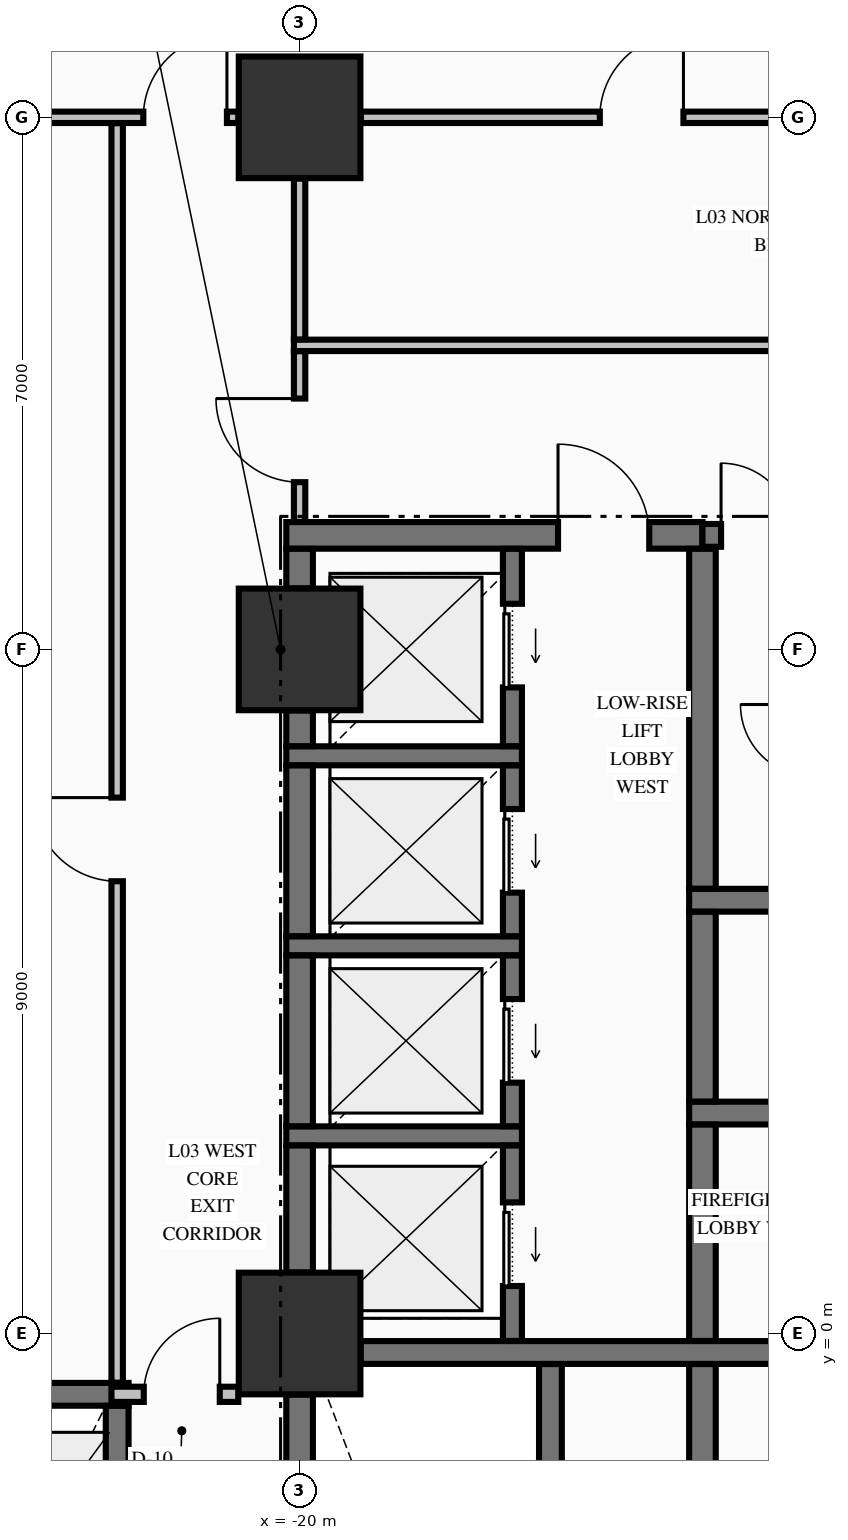
"""IFC4 building model, lengths in metres.
Left out: names, types, materials, properties, quantities, classifications, styles, units other than length and angle.
Written with IfcOpenShell. Run it as: python <this file> out.ifc"""

import sys

from ifc_helpers import new_model, si_unit, direction, frame, frame_2d, origin, origin_2d, place, context, subcontext, project, spatial, rectangle, extrude, element, fill, save


model = new_model("IFC4")
c1 = context("Model", 3, precision=1e-05, world=origin(), true_north=direction((0.0, 1.0)))
c2 = subcontext(c1, "Body", "Model", "MODEL_VIEW")
j1 = project(units=[si_unit("LENGTHUNIT", "METRE"), si_unit("PLANEANGLEUNIT", "RADIAN")], contexts=[c1])
p1 = place(None, origin())
s1 = spatial("IfcSite", under=j1, at=p1, CompositionType="ELEMENT")
p2 = place(p1, origin())
s2 = spatial("IfcBuilding", under=s1, at=p2, CompositionType="ELEMENT")
p3 = place(p2, frame((0.0, 0.0, 16.32)))
s3 = spatial("IfcBuildingStorey", under=s2, at=p3, CompositionType="ELEMENT", Elevation=16.32)
for number, where, z_axis, x_axis in (
    (1, (-20.0, 0.0, 0.0), (0.0, 0.0, 1.0), (1.0, 0.0, 0.0)),
    (2, (-20.0, 9.0, 0.0), (0.0, 0.0, 1.0), (1.0, 0.0, 0.0)),
    (3, (-20.0, 16.0, 0.0), (0.0, 0.0, 1.0), (1.0, 0.0, 0.0)),
):
    element("IfcColumn", number, at=place(p3, frame(where, z_axis=z_axis, x_axis=x_axis)), inside=s3, PredefinedType="COLUMN", context=c2, shape_type="SweptSolid", body=[
        extrude(rectangle(XDim=1.6, YDim=1.6, at=origin_2d()), origin(), (0.0, 0.0, 1.0), 4.99),
    ])
p4 = place(p3, frame((-25.296, -0.8, 0.0), z_axis=(0.0, 0.0, 1.0), x_axis=(1.0, 0.0, 0.0)))
e4 = element("IfcWall", 4, at=p4, inside=s3, PredefinedType="SHEAR", context=c2, shape_type="SweptSolid", body=[
    extrude(rectangle(XDim=3.046, YDim=0.3, at=frame_2d((1.523, 0.0))), origin(), (0.0, 0.0, 1.0), 4.99),
])
p5 = place(p3, frame((-19.196, -0.25, 0.0), z_axis=(0.0, 0.0, 1.0), x_axis=(1.0, 0.0, 0.0)))
e5 = element("IfcWall", 5, at=p5, inside=s3, PredefinedType="SHEAR", context=c2, shape_type="SweptSolid", body=[
    extrude(rectangle(XDim=7.392, YDim=0.3, at=frame_2d((3.696, 0.0))), origin(), (0.0, 0.0, 1.0), 4.99),
])
p6 = place(p5, frame((5.496, 0.0, 0.0)))
e6 = element("IfcOpeningElement", 6, at=p6, cuts=e5, PredefinedType="OPENING", context=c2, shape_type="SweptSolid", body=[
    extrude(rectangle(XDim=1.1, YDim=2.15, at=frame_2d((0.55, 1.075))), frame((0.0, 0.16, 0.0), z_axis=(0.0, -1.0, 0.0), x_axis=(1.0, 0.0, 0.0)), (0.0, 0.0, 1.0), 0.32),
])
p7 = place(p3, frame((-20.175, 2.6, 0.0), z_axis=(0.0, 0.0, 1.0), x_axis=(1.0, 0.0, 0.0)))
e7 = element("IfcWall", 7, at=p7, inside=s3, PredefinedType="SOLIDWALL", context=c2, shape_type="SweptSolid", body=[
    extrude(rectangle(XDim=3.1, YDim=0.25, at=frame_2d((1.55, 0.0))), origin(), (0.0, 0.0, 1.0), 4.99),
])
p8 = place(p3, frame((-14.875, 2.9, 0.0), z_axis=(0.0, 0.0, 1.0), x_axis=(1.0, 0.0, 0.0)))
e8 = element("IfcWall", 8, at=p8, inside=s3, PredefinedType="SHEAR", context=c2, shape_type="SweptSolid", body=[
    extrude(rectangle(XDim=4.025, YDim=0.3, at=frame_2d((2.012, 0.0))), origin(), (0.0, 0.0, 1.0), 4.99),
])
p9 = place(p8, frame((2.075, 0.0, 0.0)))
e9 = element("IfcOpeningElement", 9, at=p9, cuts=e8, PredefinedType="OPENING", context=c2, shape_type="SweptSolid", body=[
    extrude(rectangle(XDim=1.1, YDim=2.2, at=frame_2d((0.55, 1.1))), frame((0.0, 0.16, 0.0), z_axis=(0.0, -1.0, 0.0), x_axis=(1.0, 0.0, 0.0)), (0.0, 0.0, 1.0), 0.32),
])
p10 = place(p3, frame((-20.175, 5.1, 0.0), z_axis=(0.0, 0.0, 1.0), x_axis=(1.0, 0.0, 0.0)))
e10 = element("IfcWall", 10, at=p10, inside=s3, PredefinedType="SOLIDWALL", context=c2, shape_type="SweptSolid", body=[
    extrude(rectangle(XDim=3.1, YDim=0.25, at=frame_2d((1.55, 0.0))), origin(), (0.0, 0.0, 1.0), 4.99),
])
p11 = place(p3, frame((-14.875, 5.7, 0.0), z_axis=(0.0, 0.0, 1.0), x_axis=(1.0, 0.0, 0.0)))
e11 = element("IfcWall", 11, at=p11, inside=s3, PredefinedType="SHEAR", context=c2, shape_type="SweptSolid", body=[
    extrude(rectangle(XDim=4.025, YDim=0.3, at=frame_2d((2.012, 0.0))), origin(), (0.0, 0.0, 1.0), 4.99),
])
p12 = place(p3, frame((-20.175, 7.6, 0.0), z_axis=(0.0, 0.0, 1.0), x_axis=(1.0, 0.0, 0.0)))
e12 = element("IfcWall", 12, at=p12, inside=s3, PredefinedType="SOLIDWALL", context=c2, shape_type="SweptSolid", body=[
    extrude(rectangle(XDim=3.1, YDim=0.25, at=frame_2d((1.55, 0.0))), origin(), (0.0, 0.0, 1.0), 4.99),
])
p13 = place(p3, frame((-20.175, 10.5, 0.0), z_axis=(0.0, 0.0, 1.0), x_axis=(1.0, 0.0, 0.0)))
e13 = element("IfcWall", 13, at=p13, inside=s3, PredefinedType="SHEAR", context=c2, shape_type="SweptSolid", body=[
    extrude(rectangle(XDim=5.475, YDim=0.35, at=frame_2d((2.738, 0.0))), origin(), (0.0, 0.0, 1.0), 4.99),
])
p14 = place(p13, frame((3.575, 0.0, 0.0)))
e14 = element("IfcOpeningElement", 14, at=p14, cuts=e13, PredefinedType="OPENING", context=c2, shape_type="SweptSolid", body=[
    extrude(rectangle(XDim=1.2, YDim=2.15, at=frame_2d((0.6, 1.075))), frame((0.0, 0.185, 0.0), z_axis=(0.0, -1.0, 0.0), x_axis=(1.0, 0.0, 0.0)), (0.0, 0.0, 1.0), 0.37),
])
p15 = place(p3, frame((-14.7, 10.5, 0.0), z_axis=(0.0, 0.0, 1.0), x_axis=(1.0, 0.0, 0.0)))
e15 = element("IfcWall", 15, at=p15, inside=s3, PredefinedType="SHEAR", context=c2, shape_type="SweptSolid", body=[
    extrude(rectangle(XDim=3.85, YDim=0.3, at=frame_2d((1.925, 0.0))), origin(), (0.0, 0.0, 1.0), 4.99),
])
p16 = place(p15, frame((0.245, 0.0, 0.0)))
e16 = element("IfcOpeningElement", 16, at=p16, cuts=e15, PredefinedType="OPENING", context=c2, shape_type="SweptSolid", body=[
    extrude(rectangle(XDim=0.95, YDim=2.15, at=frame_2d((0.475, 1.075))), frame((0.0, 0.16, 0.0), z_axis=(0.0, -1.0, 0.0), x_axis=(1.0, 0.0, 0.0)), (0.0, 0.0, 1.0), 0.32),
])
p17 = place(p3, frame((-22.475, -0.8, 0.0), z_axis=(0.0, 0.0, 1.0), x_axis=(1.0, 0.0, 0.0)))
e17 = element("IfcWall", 17, at=p17, inside=s3, PredefinedType="PARTITIONING", context=c2, shape_type="SweptSolid", body=[
    extrude(rectangle(XDim=1.669, YDim=0.2, at=frame_2d((0.834, 0.0))), origin(), (0.0, 0.0, 1.0), 4.99),
])
p18 = place(p17, frame((0.425, 0.0, 0.0)))
e18 = element("IfcOpeningElement", 18, at=p18, cuts=e17, PredefinedType="OPENING", context=c2, shape_type="SweptSolid", body=[
    extrude(rectangle(XDim=1.0, YDim=2.15, at=frame_2d((0.5, 1.075))), frame((0.0, 0.11, 0.0), z_axis=(0.0, -1.0, 0.0), x_axis=(1.0, 0.0, 0.0)), (0.0, 0.0, 1.0), 0.22),
])
p19 = place(p3, frame((-20.075, 13.0, 0.0), z_axis=(0.0, 0.0, 1.0), x_axis=(1.0, 0.0, 0.0)))
e19 = element("IfcWall", 19, at=p19, inside=s3, PredefinedType="PARTITIONING", context=c2, shape_type="SweptSolid", body=[
    extrude(rectangle(XDim=11.415, YDim=0.15, at=frame_2d((5.708, 0.0))), origin(), (0.0, 0.0, 1.0), 4.99),
])
p20 = place(p19, frame((9.725, 0.0, 0.0)))
e20 = element("IfcOpeningElement", 20, at=p20, cuts=e19, PredefinedType="OPENING", context=c2, shape_type="SweptSolid", body=[
    extrude(rectangle(XDim=1.1, YDim=2.15, at=frame_2d((0.55, 1.075))), frame((0.0, 0.085, 0.0), z_axis=(0.0, -1.0, 0.0), x_axis=(1.0, 0.0, 0.0)), (0.0, 0.0, 1.0), 0.17),
])
p21 = place(p3, frame((-25.294, 16.0, 0.0), z_axis=(0.0, 0.0, 1.0), x_axis=(1.0, 0.0, 0.0)))
e21 = element("IfcWall", 21, at=p21, inside=s3, PredefinedType="PARTITIONING", context=c2, shape_type="SweptSolid", body=[
    extrude(rectangle(XDim=4.488, YDim=0.15, at=frame_2d((2.244, 0.0))), origin(), (0.0, 0.0, 1.0), 3.332),
])
p22 = place(p21, frame((3.238, 0.0, 0.0)))
e22 = element("IfcOpeningElement", 22, at=p22, cuts=e21, PredefinedType="OPENING", context=c2, shape_type="SweptSolid", body=[
    extrude(rectangle(XDim=1.1, YDim=2.15, at=frame_2d((0.55, 1.075))), frame((0.0, 0.085, 0.0), z_axis=(0.0, -1.0, 0.0), x_axis=(1.0, 0.0, 0.0)), (0.0, 0.0, 1.0), 0.17),
])
p23 = place(p3, frame((-19.194, 16.0, 0.0), z_axis=(0.0, 0.0, 1.0), x_axis=(1.0, 0.0, 0.0)))
e23 = element("IfcWall", 23, at=p23, inside=s3, PredefinedType="PARTITIONING", context=c2, shape_type="SweptSolid", body=[
    extrude(rectangle(XDim=7.388, YDim=0.15, at=frame_2d((3.694, 0.0))), origin(), (0.0, 0.0, 1.0), 3.332),
])
p24 = place(p23, frame((3.144, 0.0, 0.0)))
e24 = element("IfcOpeningElement", 24, at=p24, cuts=e23, PredefinedType="OPENING", context=c2, shape_type="SweptSolid", body=[
    extrude(rectangle(XDim=1.1, YDim=2.15, at=frame_2d((0.55, 1.075))), frame((0.0, 0.085, 0.0), z_axis=(0.0, -1.0, 0.0), x_axis=(1.0, 0.0, 0.0)), (0.0, 0.0, 1.0), 0.17),
])
p25 = place(p3, frame((-22.4, -4.648, 0.0), z_axis=(0.0, 0.0, 1.0), x_axis=(0.0, 1.0, 0.0)))
e25 = element("IfcWall", 25, at=p25, inside=s3, PredefinedType="SHEAR", context=c2, shape_type="SweptSolid", body=[
    extrude(rectangle(XDim=3.696, YDim=0.3, at=frame_2d((1.848, 0.0))), origin(), (0.0, 0.0, 1.0), 4.99),
])
p26 = place(p25, frame((1.198, 0.0, 0.0)))
e26 = element("IfcOpeningElement", 26, at=p26, cuts=e25, PredefinedType="OPENING", context=c2, shape_type="SweptSolid", body=[
    extrude(rectangle(XDim=1.3, YDim=2.3, at=frame_2d((0.65, 1.15))), frame((0.0, 0.16, 0.0), z_axis=(0.0, -1.0, 0.0), x_axis=(1.0, 0.0, 0.0)), (0.0, 0.0, 1.0), 0.32),
])
p27 = place(p3, frame((-20.0, -8.196, 0.0), z_axis=(0.0, 0.0, 1.0), x_axis=(0.0, 1.0, 0.0)))
e27 = element("IfcWall", 27, at=p27, inside=s3, PredefinedType="SHEAR", context=c2, shape_type="SweptSolid", body=[
    extrude(rectangle(XDim=7.392, YDim=0.35, at=frame_2d((3.696, 0.0))), origin(), (0.0, 0.0, 1.0), 4.99),
])
p28 = place(p3, frame((-20.0, 0.804, 0.0), z_axis=(0.0, 0.0, 1.0), x_axis=(0.0, 1.0, 0.0)))
e28 = element("IfcWall", 28, at=p28, inside=s3, PredefinedType="SHEAR", context=c2, shape_type="SweptSolid", body=[
    extrude(rectangle(XDim=1.669, YDim=0.35, at=frame_2d((0.834, 0.0))), origin(), (0.0, 0.0, 1.0), 4.99),
])
for number, where, z_axis, x_axis in (
    (29, (-20.0, 2.727, 0.0), (0.0, 0.0, 1.0), (0.0, 1.0, 0.0)),
    (30, (-20.0, 5.227, 0.0), (0.0, 0.0, 1.0), (0.0, 1.0, 0.0)),
):
    element("IfcWall", number, at=place(p3, frame(where, z_axis=z_axis, x_axis=x_axis)), inside=s3, PredefinedType="SHEAR", context=c2, shape_type="SweptSolid", body=[
        extrude(rectangle(XDim=2.246, YDim=0.35, at=frame_2d((1.123, 0.0))), origin(), (0.0, 0.0, 1.0), 4.99),
    ])
p29 = place(p3, frame((-20.0, 7.727, 0.0), z_axis=(0.0, 0.0, 1.0), x_axis=(0.0, 1.0, 0.0)))
e31 = element("IfcWall", 31, at=p29, inside=s3, PredefinedType="SHEAR", context=c2, shape_type="SweptSolid", body=[
    extrude(rectangle(XDim=0.469, YDim=0.35, at=frame_2d((0.234, 0.0))), origin(), (0.0, 0.0, 1.0), 4.99),
])
p30 = place(p3, frame((-20.0, 9.804, 0.0), z_axis=(0.0, 0.0, 1.0), x_axis=(0.0, 1.0, 0.0)))
e32 = element("IfcWall", 32, at=p30, inside=s3, PredefinedType="SHEAR", context=c2, shape_type="SweptSolid", body=[
    extrude(rectangle(XDim=0.519, YDim=0.35, at=frame_2d((0.26, 0.0))), origin(), (0.0, 0.0, 1.0), 4.99),
])
p31 = place(p3, frame((-17.2, -0.098, 0.0), z_axis=(0.0, 0.0, 1.0), x_axis=(0.0, 1.0, 0.0)))
e33 = element("IfcWall", 33, at=p31, inside=s3, PredefinedType="SOLIDWALL", context=c2, shape_type="SweptSolid", body=[
    extrude(rectangle(XDim=2.571, YDim=0.25, at=frame_2d((1.285, 0.0))), origin(), (0.0, 0.0, 1.0), 4.99),
])
p32 = place(p31, frame((0.723, 0.0, 0.0)))
e34 = element("IfcOpeningElement", 34, at=p32, cuts=e33, PredefinedType="OPENING", context=c2, shape_type="SweptSolid", body=[
    extrude(rectangle(XDim=1.1, YDim=2.2, at=frame_2d((0.55, 1.1))), frame((0.0, 0.135, 0.0), z_axis=(0.0, -1.0, 0.0), x_axis=(1.0, 0.0, 0.0)), (0.0, 0.0, 1.0), 0.27),
])
p33 = place(p3, frame((-17.2, 2.727, 0.0), z_axis=(0.0, 0.0, 1.0), x_axis=(0.0, 1.0, 0.0)))
e35 = element("IfcWall", 35, at=p33, inside=s3, PredefinedType="SOLIDWALL", context=c2, shape_type="SweptSolid", body=[
    extrude(rectangle(XDim=2.246, YDim=0.25, at=frame_2d((1.123, 0.0))), origin(), (0.0, 0.0, 1.0), 4.99),
])
p34 = place(p33, frame((0.573, 0.0, 0.0)))
e36 = element("IfcOpeningElement", 36, at=p34, cuts=e35, PredefinedType="OPENING", context=c2, shape_type="SweptSolid", body=[
    extrude(rectangle(XDim=1.1, YDim=2.2, at=frame_2d((0.55, 1.1))), frame((0.0, 0.135, 0.0), z_axis=(0.0, -1.0, 0.0), x_axis=(1.0, 0.0, 0.0)), (0.0, 0.0, 1.0), 0.27),
])
p35 = place(p3, frame((-17.2, 5.227, 0.0), z_axis=(0.0, 0.0, 1.0), x_axis=(0.0, 1.0, 0.0)))
e37 = element("IfcWall", 37, at=p35, inside=s3, PredefinedType="SOLIDWALL", context=c2, shape_type="SweptSolid", body=[
    extrude(rectangle(XDim=2.246, YDim=0.25, at=frame_2d((1.123, 0.0))), origin(), (0.0, 0.0, 1.0), 4.99),
])
p36 = place(p35, frame((0.573, 0.0, 0.0)))
e38 = element("IfcOpeningElement", 38, at=p36, cuts=e37, PredefinedType="OPENING", context=c2, shape_type="SweptSolid", body=[
    extrude(rectangle(XDim=1.1, YDim=2.2, at=frame_2d((0.55, 1.1))), frame((0.0, 0.135, 0.0), z_axis=(0.0, -1.0, 0.0), x_axis=(1.0, 0.0, 0.0)), (0.0, 0.0, 1.0), 0.27),
])
p37 = place(p3, frame((-17.2, 7.727, 0.0), z_axis=(0.0, 0.0, 1.0), x_axis=(0.0, 1.0, 0.0)))
e39 = element("IfcWall", 39, at=p37, inside=s3, PredefinedType="SOLIDWALL", context=c2, shape_type="SweptSolid", body=[
    extrude(rectangle(XDim=2.596, YDim=0.25, at=frame_2d((1.298, 0.0))), origin(), (0.0, 0.0, 1.0), 4.99),
])
p38 = place(p37, frame((0.773, 0.0, 0.0)))
e40 = element("IfcOpeningElement", 40, at=p38, cuts=e39, PredefinedType="OPENING", context=c2, shape_type="SweptSolid", body=[
    extrude(rectangle(XDim=1.1, YDim=2.2, at=frame_2d((0.55, 1.1))), frame((0.0, 0.135, 0.0), z_axis=(0.0, -1.0, 0.0), x_axis=(1.0, 0.0, 0.0)), (0.0, 0.0, 1.0), 0.27),
])
p39 = place(p3, frame((-16.7, -9.773, 0.0), z_axis=(0.0, 0.0, 1.0), x_axis=(0.0, 1.0, 0.0)))
e41 = element("IfcWall", 41, at=p39, inside=s3, PredefinedType="SHEAR", context=c2, shape_type="SweptSolid", body=[
    extrude(rectangle(XDim=9.371, YDim=0.3, at=frame_2d((4.686, 0.0))), origin(), (0.0, 0.0, 1.0), 4.99),
])
p40 = place(p3, frame((-14.7, -9.773, 0.0), z_axis=(0.0, 0.0, 1.0), x_axis=(0.0, 1.0, 0.0)))
e42 = element("IfcWall", 42, at=p40, inside=s3, PredefinedType="SHEAR", context=c2, shape_type="SweptSolid", body=[
    extrude(rectangle(XDim=9.371, YDim=0.35, at=frame_2d((4.686, 0.0))), origin(), (0.0, 0.0, 1.0), 4.99),
])
p41 = place(p3, frame((-14.7, -0.098, 0.0), z_axis=(0.0, 0.0, 1.0), x_axis=(0.0, 1.0, 0.0)))
e43 = element("IfcWall", 43, at=p41, inside=s3, PredefinedType="SHEAR", context=c2, shape_type="SweptSolid", body=[
    extrude(rectangle(XDim=2.846, YDim=0.35, at=frame_2d((1.423, 0.0))), origin(), (0.0, 0.0, 1.0), 4.99),
])
p42 = place(p3, frame((-14.7, 3.052, 0.0), z_axis=(0.0, 0.0, 1.0), x_axis=(0.0, 1.0, 0.0)))
e44 = element("IfcWall", 44, at=p42, inside=s3, PredefinedType="SHEAR", context=c2, shape_type="SweptSolid", body=[
    extrude(rectangle(XDim=2.496, YDim=0.35, at=frame_2d((1.248, 0.0))), origin(), (0.0, 0.0, 1.0), 4.99),
])
p43 = place(p3, frame((-14.7, 5.852, 0.0), z_axis=(0.0, 0.0, 1.0), x_axis=(0.0, 1.0, 0.0)))
e45 = element("IfcWall", 45, at=p43, inside=s3, PredefinedType="SHEAR", context=c2, shape_type="SweptSolid", body=[
    extrude(rectangle(XDim=4.471, YDim=0.35, at=frame_2d((2.235, 0.0))), origin(), (0.0, 0.0, 1.0), 4.99),
])
p44 = place(p3, frame((-22.4, -0.647, 0.0), z_axis=(0.0, 0.0, 1.0), x_axis=(0.0, 1.0, 0.0)))
e46 = element("IfcWall", 46, at=p44, inside=s3, PredefinedType="PARTITIONING", context=c2, shape_type="SweptSolid", body=[
    extrude(rectangle(XDim=16.569, YDim=0.15, at=frame_2d((8.285, 0.0))), origin(), (0.0, 0.0, 1.0), 4.99),
])
p45 = place(p44, frame((6.597, 0.0, 0.0)))
e47 = element("IfcOpeningElement", 47, at=p45, cuts=e46, PredefinedType="OPENING", context=c2, shape_type="SweptSolid", body=[
    extrude(rectangle(XDim=1.1, YDim=2.15, at=frame_2d((0.55, 1.075))), frame((0.0, 0.085, 0.0), z_axis=(0.0, -1.0, 0.0), x_axis=(1.0, 0.0, 0.0)), (0.0, 0.0, 1.0), 0.17),
])
p46 = place(p3, frame((-20.0, 10.678, 0.0), z_axis=(0.0, 0.0, 1.0), x_axis=(0.0, 1.0, 0.0)))
e48 = element("IfcWall", 48, at=p46, inside=s3, PredefinedType="PARTITIONING", context=c2, shape_type="SweptSolid", body=[
    extrude(rectangle(XDim=2.244, YDim=0.15, at=frame_2d((1.122, 0.0))), origin(), (0.0, 0.0, 1.0), 4.032),
])
p47 = place(p46, frame((0.522, 0.0, 0.0)))
e49 = element("IfcOpeningElement", 49, at=p47, cuts=e48, PredefinedType="OPENING", context=c2, shape_type="SweptSolid", body=[
    extrude(rectangle(XDim=1.1, YDim=2.15, at=frame_2d((0.55, 1.075))), frame((0.0, 0.085, 0.0), z_axis=(0.0, -1.0, 0.0), x_axis=(1.0, 0.0, 0.0)), (0.0, 0.0, 1.0), 0.17),
])
p48 = place(p3, frame((-20.0, 13.078, 0.0), z_axis=(0.0, 0.0, 1.0), x_axis=(0.0, 1.0, 0.0)))
e50 = element("IfcWall", 50, at=p48, inside=s3, PredefinedType="PARTITIONING", context=c2, shape_type="SweptSolid", body=[
    extrude(rectangle(XDim=2.116, YDim=0.15, at=frame_2d((1.058, 0.0))), origin(), (0.0, 0.0, 1.0), 4.032),
])
p49 = place(p16, origin())
e51 = element("IfcDoor", 51, at=p49, inside=s3, OperationType="SINGLE_SWING_LEFT", PredefinedType="DOOR", context=c2, shape_type="SweptSolid", body=[
    extrude(rectangle(XDim=0.95, YDim=2.15, at=frame_2d((0.475, 1.075))), frame((0.0, 0.025, 0.0), z_axis=(0.0, -1.0, 0.0), x_axis=(1.0, 0.0, 0.0)), (0.0, 0.0, 1.0), 0.05),
])
fill(e16, e51)
p50 = place(p14, origin())
e52 = element("IfcDoor", 52, at=p50, inside=s3, OperationType="SINGLE_SWING_LEFT", PredefinedType="DOOR", context=c2, shape_type="SweptSolid", body=[
    extrude(rectangle(XDim=1.2, YDim=2.15, at=frame_2d((0.6, 1.075))), frame((0.0, 0.025, 0.0), z_axis=(0.0, -1.0, 0.0), x_axis=(1.0, 0.0, 0.0)), (0.0, 0.0, 1.0), 0.05),
])
fill(e14, e52)
p51 = place(p32, origin())
e53 = element("IfcDoor", 53, at=p51, inside=s3, OperationType="SLIDING_TO_LEFT", PredefinedType="DOOR", context=c2, shape_type="SweptSolid", body=[
    extrude(rectangle(XDim=1.1, YDim=2.2, at=frame_2d((0.55, 1.1))), frame((0.0, 0.025, 0.0), z_axis=(0.0, -1.0, 0.0), x_axis=(1.0, 0.0, 0.0)), (0.0, 0.0, 1.0), 0.05),
])
fill(e34, e53)
p52 = place(p34, origin())
e54 = element("IfcDoor", 54, at=p52, inside=s3, OperationType="SLIDING_TO_LEFT", PredefinedType="DOOR", context=c2, shape_type="SweptSolid", body=[
    extrude(rectangle(XDim=1.1, YDim=2.2, at=frame_2d((0.55, 1.1))), frame((0.0, 0.025, 0.0), z_axis=(0.0, -1.0, 0.0), x_axis=(1.0, 0.0, 0.0)), (0.0, 0.0, 1.0), 0.05),
])
fill(e36, e54)
p53 = place(p36, origin())
e55 = element("IfcDoor", 55, at=p53, inside=s3, OperationType="SLIDING_TO_LEFT", PredefinedType="DOOR", context=c2, shape_type="SweptSolid", body=[
    extrude(rectangle(XDim=1.1, YDim=2.2, at=frame_2d((0.55, 1.1))), frame((0.0, 0.025, 0.0), z_axis=(0.0, -1.0, 0.0), x_axis=(1.0, 0.0, 0.0)), (0.0, 0.0, 1.0), 0.05),
])
fill(e38, e55)
p54 = place(p38, origin())
e56 = element("IfcDoor", 56, at=p54, inside=s3, OperationType="SLIDING_TO_LEFT", PredefinedType="DOOR", context=c2, shape_type="SweptSolid", body=[
    extrude(rectangle(XDim=1.1, YDim=2.2, at=frame_2d((0.55, 1.1))), frame((0.0, 0.025, 0.0), z_axis=(0.0, -1.0, 0.0), x_axis=(1.0, 0.0, 0.0)), (0.0, 0.0, 1.0), 0.05),
])
fill(e40, e56)
p55 = place(p18, origin())
e57 = element("IfcDoor", 57, at=p55, inside=s3, OperationType="SINGLE_SWING_RIGHT", PredefinedType="DOOR", context=c2, shape_type="SweptSolid", body=[
    extrude(rectangle(XDim=1.0, YDim=2.15, at=frame_2d((0.5, 1.075))), frame((0.0, 0.025, 0.0), z_axis=(0.0, -1.0, 0.0), x_axis=(1.0, 0.0, 0.0)), (0.0, 0.0, 1.0), 0.05),
])
fill(e18, e57)
p56 = place(p24, origin())
e58 = element("IfcDoor", 58, at=p56, inside=s3, OperationType="SINGLE_SWING_RIGHT", PredefinedType="DOOR", context=c2, shape_type="SweptSolid", body=[
    extrude(rectangle(XDim=1.1, YDim=2.15, at=frame_2d((0.55, 1.075))), frame((0.0, 0.025, 0.0), z_axis=(0.0, -1.0, 0.0), x_axis=(1.0, 0.0, 0.0)), (0.0, 0.0, 1.0), 0.05),
])
fill(e24, e58)
p57 = place(p45, origin())
e59 = element("IfcDoor", 59, at=p57, inside=s3, OperationType="SINGLE_SWING_RIGHT", PredefinedType="DOOR", context=c2, shape_type="SweptSolid", body=[
    extrude(rectangle(XDim=1.1, YDim=2.15, at=frame_2d((0.55, 1.075))), frame((0.0, 0.025, 0.0), z_axis=(0.0, -1.0, 0.0), x_axis=(1.0, 0.0, 0.0)), (0.0, 0.0, 1.0), 0.05),
])
fill(e47, e59)
p58 = place(p22, origin())
e60 = element("IfcDoor", 60, at=p58, inside=s3, OperationType="SINGLE_SWING_RIGHT", PredefinedType="DOOR", context=c2, shape_type="SweptSolid", body=[
    extrude(rectangle(XDim=1.1, YDim=2.15, at=frame_2d((0.55, 1.075))), frame((0.0, 0.025, 0.0), z_axis=(0.0, -1.0, 0.0), x_axis=(1.0, 0.0, 0.0)), (0.0, 0.0, 1.0), 0.05),
])
fill(e22, e60)
p59 = place(p47, origin())
e61 = element("IfcDoor", 61, at=p59, inside=s3, OperationType="SINGLE_SWING_RIGHT", PredefinedType="DOOR", context=c2, shape_type="SweptSolid", body=[
    extrude(rectangle(XDim=1.1, YDim=2.15, at=frame_2d((0.55, 1.075))), frame((0.0, 0.025, 0.0), z_axis=(0.0, -1.0, 0.0), x_axis=(1.0, 0.0, 0.0)), (0.0, 0.0, 1.0), 0.05),
])
fill(e49, e61)
save(model, sys.argv[1])
